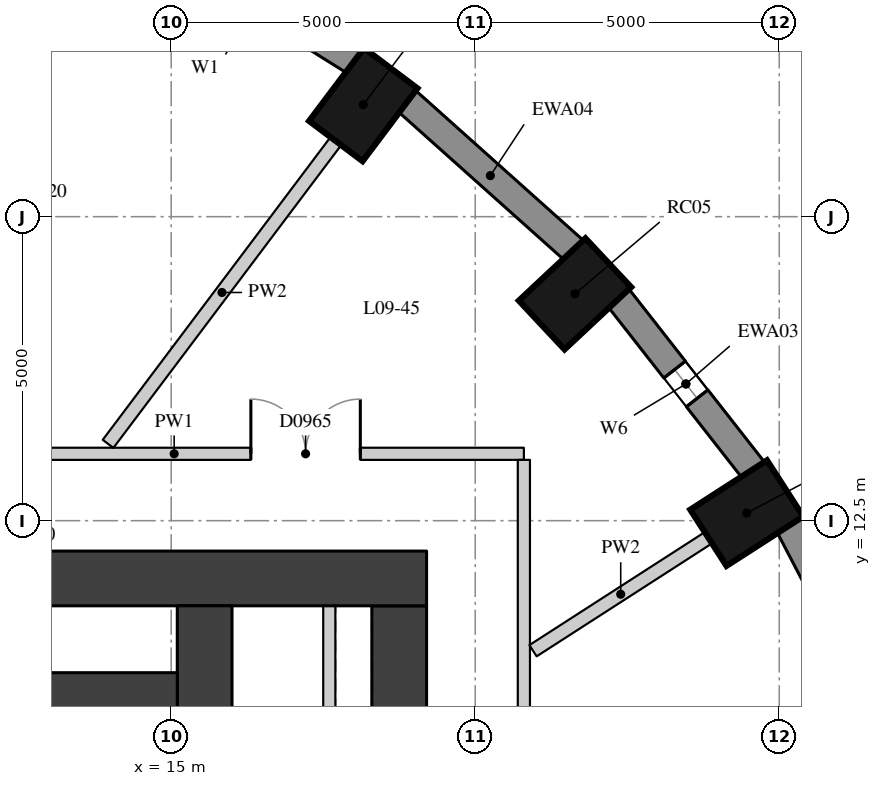
"""IFC4 building model, lengths in metres.
Left out: names, types, materials, properties, quantities, classifications, styles, units other than length and angle.
Written with IfcOpenShell. Run it as: python <this file> out.ifc"""

import sys

from ifc_helpers import new_model, si_unit, direction, frame, frame_2d, origin, origin_2d, place, context, subcontext, project, spatial, rectangle, extrude, element, fill, save


model = new_model("IFC4")
c1 = context("Model", 3, precision=1e-05, world=origin(), true_north=direction((0.0, 1.0)))
c2 = subcontext(c1, "Body", "Model", "MODEL_VIEW")
j1 = project(units=[si_unit("LENGTHUNIT", "METRE"), si_unit("PLANEANGLEUNIT", "RADIAN")], contexts=[c1])
p1 = place(None, origin())
s1 = spatial("IfcSite", under=j1, at=p1, CompositionType="ELEMENT")
p2 = place(p1, origin())
s2 = spatial("IfcBuilding", under=s1, at=p2, CompositionType="ELEMENT")
p3 = place(p2, frame((0.0, 0.0, 38.2)))
s3 = spatial("IfcBuildingStorey", under=s2, at=p3, CompositionType="ELEMENT", Elevation=38.2)
for number, where, z_axis, x_axis in (
    (1, (24.465, 12.625, 0.0), (0.0, 0.0, 1.0), (0.841, 0.541, 0.0)),
    (2, (21.641, 16.23, 0.0), (0.0, 0.0, 1.0), (0.73, 0.683, 0.0)),
    (3, (18.159, 19.343, 0.0), (0.0, 0.0, 1.0), (0.601, 0.799, 0.0)),
):
    element("IfcColumn", number, at=place(p3, frame(where, z_axis=z_axis, x_axis=x_axis)), inside=s3, PredefinedType="COLUMN", context=c2, shape_type="SweptSolid", body=[
        extrude(rectangle(XDim=1.5, YDim=1.1, at=origin_2d()), origin(), (0.0, 0.0, 1.0), 3.3),
    ])
p4 = place(p3, frame((26.786, 9.305, 0.0), z_axis=(0.0, 0.0, 1.0), x_axis=(-0.462492775226, 0.886623050041, 0.0)))
e4 = element("IfcWall", 4, at=p4, inside=s3, PredefinedType="SOLIDWALL", context=c2, shape_type="SweptSolid", body=[
    extrude(rectangle(XDim=3.532, YDim=0.45, at=frame_2d((1.766, 0.0))), origin(), (0.0, 0.0, 1.0), 3.02),
])
p5 = place(p3, frame((24.578, 13.328, 0.0), z_axis=(0.0, 0.0, 1.0), x_axis=(-0.616661975264, 0.787228053529, 0.0)))
e5 = element("IfcWall", 5, at=p5, inside=s3, PredefinedType="SOLIDWALL", context=c2, shape_type="SweptSolid", body=[
    extrude(rectangle(XDim=3.61, YDim=0.45, at=frame_2d((1.805, 0.0))), origin(), (0.0, 0.0, 1.0), 3.02),
])
p6 = place(p5, frame((1.505, 0.0, 0.4)))
e6 = element("IfcOpeningElement", 6, at=p6, cuts=e5, PredefinedType="OPENING", context=c2, shape_type="SweptSolid", body=[
    extrude(rectangle(XDim=0.6, YDim=1.75, at=frame_2d((0.3, 0.875))), frame((0.0, 0.235, 0.0), z_axis=(0.0, -1.0, 0.0), x_axis=(1.0, 0.0, 0.0)), (0.0, 0.0, 1.0), 0.47),
])
p7 = place(p3, frame((21.627, 16.943, 0.0), z_axis=(0.0, 0.0, 1.0), x_axis=(-0.745526233716, 0.66647628228, 0.0)))
e7 = element("IfcWall", 7, at=p7, inside=s3, PredefinedType="SOLIDWALL", context=c2, shape_type="SweptSolid", body=[
    extrude(rectangle(XDim=3.697, YDim=0.45, at=frame_2d((1.848, 0.0))), origin(), (0.0, 0.0, 1.0), 3.02),
])
p8 = place(p3, frame((18.023, 20.044, 0.0), z_axis=(0.0, 0.0, 1.0), x_axis=(-0.847635480093, 0.530579016629, 0.0)))
e8 = element("IfcWall", 8, at=p8, inside=s3, PredefinedType="SOLIDWALL", context=c2, shape_type="SweptSolid", body=[
    extrude(rectangle(XDim=3.782, YDim=0.45, at=frame_2d((1.891, 0.0))), origin(), (0.0, 0.0, 1.0), 3.02),
])
p9 = place(p8, frame((0.791, 0.0, 0.4)))
e9 = element("IfcOpeningElement", 9, at=p9, cuts=e8, PredefinedType="OPENING", context=c2, shape_type="SweptSolid", body=[
    extrude(rectangle(XDim=2.2, YDim=1.75, at=frame_2d((1.1, 0.875))), frame((0.0, 0.235, 0.0), z_axis=(0.0, -1.0, 0.0), x_axis=(1.0, 0.0, 0.0)), (0.0, 0.0, 1.0), 0.47),
])
p10 = place(p3, frame((18.75, -11.1, 0.0), z_axis=(0.0, 0.0, 1.0), x_axis=(0.0, 1.0, 0.0)))
e10 = element("IfcWall", 10, at=p10, inside=s3, PredefinedType="SHEAR", context=c2, shape_type="SweptSolid", body=[
    extrude(rectangle(XDim=22.2, YDim=0.9, at=frame_2d((11.1, 0.0))), origin(), (0.0, 0.0, 1.0), 3.02),
])
p11 = place(p10, frame((15.675, 0.0, 0.0)))
e11 = element("IfcOpeningElement", 11, at=p11, cuts=e10, PredefinedType="OPENING", context=c2, shape_type="SweptSolid", body=[
    extrude(rectangle(XDim=1.5, YDim=2.1, at=frame_2d((0.75, 1.05))), frame((0.0, 0.46, 0.0), z_axis=(0.0, -1.0, 0.0), x_axis=(1.0, 0.0, 0.0)), (0.0, 0.0, 1.0), 0.92),
])
p12 = place(p10, frame((4.775, 0.0, 0.0)))
e12 = element("IfcOpeningElement", 12, at=p12, cuts=e10, PredefinedType="OPENING", context=c2, shape_type="SweptSolid", body=[
    extrude(rectangle(XDim=1.5, YDim=2.1, at=frame_2d((0.75, 1.05))), frame((0.0, 0.46, 0.0), z_axis=(0.0, -1.0, 0.0), x_axis=(1.0, 0.0, 0.0)), (0.0, 0.0, 1.0), 0.92),
])
p13 = place(p3, frame((4.0, 11.55, 0.0), z_axis=(0.0, 0.0, 1.0), x_axis=(1.0, 0.0, 0.0)))
e13 = element("IfcWall", 13, at=p13, inside=s3, PredefinedType="SHEAR", context=c2, shape_type="SweptSolid", body=[
    extrude(rectangle(XDim=15.2, YDim=0.9, at=frame_2d((7.6, 0.0))), origin(), (0.0, 0.0, 1.0), 3.02),
])
p14 = place(p3, frame((15.55, -11.1, 0.0), z_axis=(0.0, 0.0, 1.0), x_axis=(0.0, 1.0, 0.0)))
e14 = element("IfcWall", 14, at=p14, inside=s3, PredefinedType="SHEAR", context=c2, shape_type="SweptSolid", body=[
    extrude(rectangle(XDim=22.2, YDim=0.9, at=frame_2d((11.1, 0.0))), origin(), (0.0, 0.0, 1.0), 3.02),
])
p15 = place(p14, frame((15.6, 0.0, 0.0)))
e15 = element("IfcOpeningElement", 15, at=p15, cuts=e14, PredefinedType="OPENING", context=c2, shape_type="SweptSolid", body=[
    extrude(rectangle(XDim=1.0, YDim=2.1, at=frame_2d((0.5, 1.05))), frame((0.0, 0.46, 0.0), z_axis=(0.0, -1.0, 0.0), x_axis=(1.0, 0.0, 0.0)), (0.0, 0.0, 1.0), 0.92),
])
p16 = place(p14, frame((5.6, 0.0, 0.0)))
e16 = element("IfcOpeningElement", 16, at=p16, cuts=e14, PredefinedType="OPENING", context=c2, shape_type="SweptSolid", body=[
    extrude(rectangle(XDim=1.0, YDim=2.1, at=frame_2d((0.5, 1.05))), frame((0.0, 0.46, 0.0), z_axis=(0.0, -1.0, 0.0), x_axis=(1.0, 0.0, 0.0)), (0.0, 0.0, 1.0), 0.92),
])
p17 = place(p3, frame((4.9, 9.55, 0.0), z_axis=(0.0, 0.0, 1.0), x_axis=(1.0, 0.0, 0.0)))
e17 = element("IfcWall", 17, at=p17, inside=s3, PredefinedType="SHEAR", context=c2, shape_type="SweptSolid", body=[
    extrude(rectangle(XDim=10.2, YDim=0.9, at=frame_2d((5.1, 0.0))), origin(), (0.0, 0.0, 1.0), 3.02),
])
p18 = place(p3, frame((17.6, 6.4, 0.0), z_axis=(0.0, 0.0, 1.0), x_axis=(0.0, 1.0, 0.0)))
e18 = element("IfcWall", 18, at=p18, inside=s3, PredefinedType="PARTITIONING", context=c2, shape_type="SweptSolid", body=[
    extrude(rectangle(XDim=4.7, YDim=0.2, at=frame_2d((2.35, 0.0))), origin(), (0.0, 0.0, 1.0), 3.02),
])
p19 = place(p3, frame((9.297, 13.6, 0.0), z_axis=(0.0, 0.0, 1.0), x_axis=(1.0, 0.0, 0.0)))
e19 = element("IfcWall", 19, at=p19, inside=s3, PredefinedType="PARTITIONING", context=c2, shape_type="SweptSolid", body=[
    extrude(rectangle(XDim=11.503, YDim=0.2, at=frame_2d((5.751, 0.0))), origin(), (0.0, 0.0, 1.0), 3.02),
])
p20 = place(p19, frame((0.22, 0.0, 0.0)))
e20 = element("IfcOpeningElement", 20, at=p20, cuts=e19, PredefinedType="OPENING", context=c2, shape_type="SweptSolid", body=[
    extrude(rectangle(XDim=1.1, YDim=2.1, at=frame_2d((0.55, 1.05))), frame((0.0, 0.11, 0.0), z_axis=(0.0, -1.0, 0.0), x_axis=(1.0, 0.0, 0.0)), (0.0, 0.0, 1.0), 0.22),
])
p21 = place(p19, frame((7.013, 0.0, 0.0)))
e21 = element("IfcOpeningElement", 21, at=p21, cuts=e19, PredefinedType="OPENING", context=c2, shape_type="SweptSolid", body=[
    extrude(rectangle(XDim=1.8, YDim=2.1, at=frame_2d((0.9, 1.05))), frame((0.0, 0.11, 0.0), z_axis=(0.0, -1.0, 0.0), x_axis=(1.0, 0.0, 0.0)), (0.0, 0.0, 1.0), 0.22),
])
p22 = place(p3, frame((20.8, 13.5, 0.0), z_axis=(0.0, 0.0, 1.0), x_axis=(0.0, -1.0, 0.0)))
e22 = element("IfcWall", 22, at=p22, inside=s3, PredefinedType="PARTITIONING", context=c2, shape_type="SweptSolid", body=[
    extrude(rectangle(XDim=27.1, YDim=0.2, at=frame_2d((13.55, 0.0))), origin(), (0.0, 0.0, 1.0), 3.02),
])
p23 = place(p22, frame((17.733, 0.0, 0.0)))
e23 = element("IfcOpeningElement", 23, at=p23, cuts=e22, PredefinedType="OPENING", context=c2, shape_type="SweptSolid", body=[
    extrude(rectangle(XDim=1.8, YDim=2.1, at=frame_2d((0.9, 1.05))), frame((0.0, 0.11, 0.0), z_axis=(0.0, -1.0, 0.0), x_axis=(1.0, 0.0, 0.0)), (0.0, 0.0, 1.0), 0.22),
])
p24 = place(p22, frame((7.467, 0.0, 0.0)))
e24 = element("IfcOpeningElement", 24, at=p24, cuts=e22, PredefinedType="OPENING", context=c2, shape_type="SweptSolid", body=[
    extrude(rectangle(XDim=1.8, YDim=2.1, at=frame_2d((0.9, 1.05))), frame((0.0, 0.11, 0.0), z_axis=(0.0, -1.0, 0.0), x_axis=(1.0, 0.0, 0.0)), (0.0, 0.0, 1.0), 0.22),
])
p25 = place(p3, frame((23.835, 12.219, 0.0), z_axis=(0.0, 0.0, 1.0), x_axis=(-0.840694872373, -0.541509124176, 0.0)))
e25 = element("IfcWall", 25, at=p25, inside=s3, PredefinedType="PARTITIONING", context=c2, shape_type="SweptSolid", body=[
    extrude(rectangle(XDim=3.43, YDim=0.22, at=frame_2d((1.715, 0.0))), origin(), (0.0, 0.0, 1.0), 3.02),
])
p26 = place(p3, frame((17.708, 18.743, 0.0), z_axis=(0.0, 0.0, 1.0), x_axis=(-0.601177883261, -0.799115231164, 0.0)))
e26 = element("IfcWall", 26, at=p26, inside=s3, PredefinedType="PARTITIONING", context=c2, shape_type="SweptSolid", body=[
    extrude(rectangle(XDim=6.231, YDim=0.22, at=frame_2d((3.116, 0.0))), origin(), (0.0, 0.0, 1.0), 3.02),
])
p27 = place(p6, origin())
e27 = element("IfcWindow", 27, at=p27, inside=s3, PartitioningType="SINGLE_PANEL", PredefinedType="WINDOW", context=c2, shape_type="SweptSolid", body=[
    extrude(rectangle(XDim=0.6, YDim=1.75, at=frame_2d((0.3, 0.875))), frame((0.0, 0.035, 0.0), z_axis=(0.0, -1.0, 0.0), x_axis=(1.0, 0.0, 0.0)), (0.0, 0.0, 1.0), 0.06),
])
fill(e6, e27)
p28 = place(p21, origin())
e28 = element("IfcDoor", 28, at=p28, inside=s3, OperationType="DOUBLE_DOOR_SINGLE_SWING", PredefinedType="DOOR", context=c2, shape_type="SweptSolid", body=[
    extrude(rectangle(XDim=1.8, YDim=2.1, at=frame_2d((0.9, 1.05))), frame((0.0, 0.025, 0.0), z_axis=(0.0, -1.0, 0.0), x_axis=(1.0, 0.0, 0.0)), (0.0, 0.0, 1.0), 0.05),
])
fill(e21, e28)
save(model, sys.argv[1])
